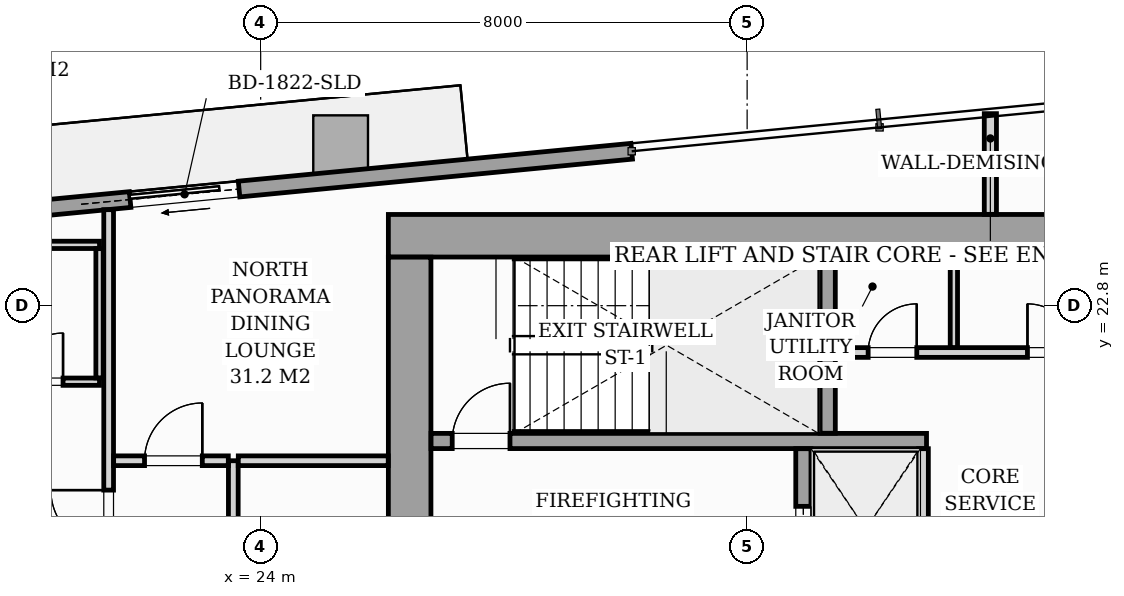
"""IFC4 building model, lengths in metres.
Left out: names, types, materials, properties, quantities, classifications, styles, units other than length and angle.
Written with IfcOpenShell. Run it as: python <this file> out.ifc"""

import sys

from ifc_helpers import new_model, si_unit, direction, frame, frame_2d, origin, origin_2d, place, context, subcontext, project, spatial, rectangle, i_section, extrude, source, transform, mapped, element, fill, save


model = new_model("IFC4")
c1 = context("Model", 3, precision=1e-05, world=origin(), true_north=direction((0.0, 1.0)))
c2 = subcontext(c1, "Body", "Model", "MODEL_VIEW")
j1 = project(units=[si_unit("LENGTHUNIT", "METRE"), si_unit("PLANEANGLEUNIT", "RADIAN")], contexts=[c1])
p1 = place(None, origin())
s1 = spatial("IfcSite", under=j1, at=p1, CompositionType="ELEMENT")
p2 = place(p1, origin())
s2 = spatial("IfcBuilding", under=s1, at=p2, CompositionType="ELEMENT")
p3 = place(p2, frame((0.0, 0.0, 113.0)))
s3 = spatial("IfcBuildingStorey", under=s2, at=p3, CompositionType="ELEMENT", Elevation=113.0)
m1 = source(origin(), c2, "Body", "SweptSolid", [
    extrude(i_section(OverallWidth=0.427, OverallDepth=0.483, WebThickness=0.051, FlangeThickness=0.082, FilletRadius=0.018, at=origin_2d()), origin(), (0.0, 0.0, 1.0), 3.196),
])
for number, where, z_axis, x_axis in (
    (1, (26.4, 24.0, 0.002), (0.0, 0.0, 1.0), (1.0, 0.0, 0.0)),
    (2, (33.12, 24.0, 0.002), (0.0, 0.0, 1.0), (1.0, 0.0, 0.0)),
):
    element("IfcColumn", number, at=place(p3, frame(where, z_axis=z_axis, x_axis=x_axis)), inside=s3, PredefinedType="PILASTER", context=c2, shape_type="MappedRepresentation", body=[
        mapped(m1, transform((0.0, 0.0, 0.0), scale=1.0)),
    ])
m2 = source(origin(), c2, "Body", "SweptSolid", [
    extrude(rectangle(XDim=0.9, YDim=1.1, at=origin_2d()), origin(), (0.0, 0.0, 1.0), 3.196),
])
p4 = place(p3, frame((25.315, 25.38, 0.002), z_axis=(0.0, 0.0, 1.0), x_axis=(0.995396198367, 0.09584575252, 0.0)))
e3 = element("IfcColumn", 3, at=p4, inside=s3, PredefinedType="COLUMN", context=c2, shape_type="MappedRepresentation", body=[
    mapped(m2, transform((0.0, 0.0, 0.0), scale=1.0)),
])
p5 = place(p3, frame((11.08, 23.508, 0.0), z_axis=(0.0, 0.0, 1.0), x_axis=(0.995396638587, 0.095841180552, 0.0)))
e4 = element("IfcWall", 4, at=p5, inside=s3, PredefinedType="STANDARD", context=c2, shape_type="SweptSolid", body=[
    extrude(rectangle(XDim=19.11, YDim=0.26, at=frame_2d((9.555, 0.0))), origin(), (0.0, 0.0, 1.0), 2.94),
])
p6 = place(p5, frame((10.823, 0.0, 0.0)))
e5 = element("IfcOpeningElement", 5, at=p6, cuts=e4, PredefinedType="OPENING", context=c2, shape_type="SweptSolid", body=[
    extrude(rectangle(XDim=1.8, YDim=2.06, at=frame_2d((0.9, 1.03))), frame((0.0, 0.14, 0.0), z_axis=(0.0, -1.0, 0.0), x_axis=(1.0, 0.0, 0.0)), (0.0, 0.0, 1.0), 0.28),
])
p7 = place(p5, frame((2.05, 0.0, 0.65)))
e6 = element("IfcOpeningElement", 6, at=p7, cuts=e4, PredefinedType="OPENING", context=c2, shape_type="SweptSolid", body=[
    extrude(rectangle(XDim=1.6, YDim=1.5, at=frame_2d((0.8, 0.75))), frame((0.0, 0.14, 0.0), z_axis=(0.0, -1.0, 0.0), x_axis=(1.0, 0.0, 0.0)), (0.0, 0.0, 1.0), 0.28),
])
p8 = place(p3, frame((26.1, 23.95, 0.0), z_axis=(0.0, 0.0, 1.0), x_axis=(1.0, 0.0, 0.0)))
e7 = element("IfcWall", 7, at=p8, inside=s3, PredefinedType="SHEAR", context=c2, shape_type="SweptSolid", body=[
    extrude(rectangle(XDim=19.8, YDim=0.7, at=frame_2d((9.9, 0.0))), origin(), (0.0, 0.0, 1.0), 3.2),
])
p9 = place(p3, frame((26.45, 17.802, 0.0), z_axis=(0.0, 0.0, 1.0), x_axis=(0.0, 1.0, 0.0)))
e8 = element("IfcWall", 8, at=p9, inside=s3, PredefinedType="SHEAR", context=c2, shape_type="SweptSolid", body=[
    extrude(rectangle(XDim=5.796, YDim=0.7, at=frame_2d((2.898, 0.0))), origin(), (0.0, 0.0, 1.0), 3.2),
])
p10 = place(p3, frame((26.802, 20.575, 0.0), z_axis=(0.0, 0.0, 1.0), x_axis=(1.0, 0.0, 0.0)))
e9 = element("IfcWall", 9, at=p10, inside=s3, PredefinedType="SOLIDWALL", context=c2, shape_type="SweptSolid", body=[
    extrude(rectangle(XDim=8.148, YDim=0.25, at=frame_2d((4.074, 0.0))), origin(), (0.0, 0.0, 1.0), 3.2),
])
p11 = place(p10, frame((0.348, 0.0, 0.0)))
e10 = element("IfcOpeningElement", 10, at=p11, cuts=e9, PredefinedType="OPENING", context=c2, shape_type="SweptSolid", body=[
    extrude(rectangle(XDim=0.95, YDim=2.06, at=frame_2d((0.475, 1.03))), frame((0.0, 0.135, 0.0), z_axis=(0.0, -1.0, 0.0), x_axis=(1.0, 0.0, 0.0)), (0.0, 0.0, 1.0), 0.27),
])
p12 = place(p3, frame((33.325, 20.702, 0.0), z_axis=(0.0, 0.0, 1.0), x_axis=(0.0, 1.0, 0.0)))
e11 = element("IfcWall", 11, at=p12, inside=s3, PredefinedType="SOLIDWALL", context=c2, shape_type="SweptSolid", body=[
    extrude(rectangle(XDim=2.896, YDim=0.25, at=frame_2d((1.448, 0.0))), origin(), (0.0, 0.0, 1.0), 3.2),
])
p13 = place(p3, frame((32.925, 17.802, 0.0), z_axis=(0.0, 0.0, 1.0), x_axis=(0.0, 1.0, 0.0)))
e12 = element("IfcWall", 12, at=p13, inside=s3, PredefinedType="SOLIDWALL", context=c2, shape_type="SweptSolid", body=[
    extrude(rectangle(XDim=2.646, YDim=0.25, at=frame_2d((1.323, 0.0))), origin(), (0.0, 0.0, 1.0), 3.2),
])
p14 = place(p13, frame((0.598, 0.0, 0.0)))
e13 = element("IfcOpeningElement", 13, at=p14, cuts=e12, PredefinedType="OPENING", context=c2, shape_type="SweptSolid", body=[
    extrude(rectangle(XDim=1.1, YDim=2.08, at=frame_2d((0.55, 1.04))), frame((0.0, 0.135, 0.0), z_axis=(0.0, -1.0, 0.0), x_axis=(1.0, 0.0, 0.0)), (0.0, 0.0, 1.0), 0.27),
])
p15 = place(p3, frame((34.9, 17.802, 0.0), z_axis=(0.0, 0.0, 1.0), x_axis=(0.0, 1.0, 0.0)))
e14 = element("IfcWall", 14, at=p15, inside=s3, PredefinedType="PARTITIONING", context=c2, shape_type="SweptSolid", body=[
    extrude(rectangle(XDim=2.646, YDim=0.16, at=frame_2d((1.323, 0.0))), origin(), (0.0, 0.0, 1.0), 2.94),
])
p16 = place(p3, frame((33.452, 22.03, 0.0), z_axis=(0.0, 0.0, 1.0), x_axis=(1.0, 0.0, 0.0)))
e15 = element("IfcWall", 15, at=p16, inside=s3, PredefinedType="PARTITIONING", context=c2, shape_type="SweptSolid", body=[
    extrude(rectangle(XDim=5.096, YDim=0.16, at=frame_2d((2.548, 0.0))), origin(), (0.0, 0.0, 1.0), 2.94),
])
p17 = place(p16, frame((0.538, 0.0, 0.0)))
e16 = element("IfcOpeningElement", 16, at=p17, cuts=e15, PredefinedType="OPENING", context=c2, shape_type="SweptSolid", body=[
    extrude(rectangle(XDim=0.8, YDim=2.05, at=frame_2d((0.4, 1.025))), frame((0.0, 0.09, 0.0), z_axis=(0.0, -1.0, 0.0), x_axis=(1.0, 0.0, 0.0)), (0.0, 0.0, 1.0), 0.18),
])
p18 = place(p16, frame((3.158, 0.0, 0.0)))
e17 = element("IfcOpeningElement", 17, at=p18, cuts=e15, PredefinedType="OPENING", context=c2, shape_type="SweptSolid", body=[
    extrude(rectangle(XDim=0.8, YDim=2.05, at=frame_2d((0.4, 1.025))), frame((0.0, 0.09, 0.0), z_axis=(0.0, -1.0, 0.0), x_axis=(1.0, 0.0, 0.0)), (0.0, 0.0, 1.0), 0.18),
])
p19 = place(p3, frame((35.4, 22.112, 0.0), z_axis=(0.0, 0.0, 1.0), x_axis=(0.0, 1.0, 0.0)))
e18 = element("IfcWall", 18, at=p19, inside=s3, PredefinedType="PARTITIONING", context=c2, shape_type="SweptSolid", body=[
    extrude(rectangle(XDim=1.486, YDim=0.12, at=frame_2d((0.743, 0.0))), origin(), (0.0, 0.0, 1.0), 2.94),
])
p20 = place(p3, frame((21.5, 12.732, 0.0), z_axis=(0.0, 0.0, 1.0), x_axis=(0.0, 1.0, 0.0)))
e19 = element("IfcWall", 19, at=p20, inside=s3, PredefinedType="PARTITIONING", context=c2, shape_type="SweptSolid", body=[
    extrude(rectangle(XDim=11.647, YDim=0.16, at=frame_2d((5.823, 0.0))), origin(), (0.0, 0.0, 1.0), 2.94),
])
p21 = place(p20, frame((0.493, 0.0, 0.0)))
e20 = element("IfcOpeningElement", 20, at=p21, cuts=e19, PredefinedType="OPENING", context=c2, shape_type="SweptSolid", body=[
    extrude(rectangle(XDim=0.95, YDim=2.06, at=frame_2d((0.475, 1.03))), frame((0.0, 0.09, 0.0), z_axis=(0.0, -1.0, 0.0), x_axis=(1.0, 0.0, 0.0)), (0.0, 0.0, 1.0), 0.18),
])
p22 = place(p20, frame((6.085, 0.0, 0.0)))
e21 = element("IfcOpeningElement", 21, at=p22, cuts=e19, PredefinedType="OPENING", context=c2, shape_type="SweptSolid", body=[
    extrude(rectangle(XDim=0.95, YDim=2.06, at=frame_2d((0.475, 1.03))), frame((0.0, 0.09, 0.0), z_axis=(0.0, -1.0, 0.0), x_axis=(1.0, 0.0, 0.0)), (0.0, 0.0, 1.0), 0.18),
])
p23 = place(p3, frame((36.0, 24.302, 0.0), z_axis=(0.0, 0.0, 1.0), x_axis=(0.0, 1.0, 0.0)))
e22 = element("IfcWall", 22, at=p23, inside=s3, PredefinedType="PARTITIONING", context=c2, shape_type="SweptSolid", body=[
    extrude(rectangle(XDim=1.656, YDim=0.2, at=frame_2d((0.828, 0.0))), origin(), (0.0, 0.0, 1.0), 2.94),
])
p24 = place(p3, frame((17.15, 21.55, 0.0), z_axis=(0.0, 0.0, 1.0), x_axis=(1.0, 0.0, 0.0)))
e23 = element("IfcWall", 23, at=p24, inside=s3, PredefinedType="PARTITIONING", context=c2, shape_type="SweptSolid", body=[
    extrude(rectangle(XDim=4.2, YDim=0.12, at=frame_2d((2.1, 0.0))), origin(), (0.0, 0.0, 1.0), 2.94),
])
p25 = place(p24, frame((0.675, 0.0, 0.0)))
e24 = element("IfcOpeningElement", 24, at=p25, cuts=e23, PredefinedType="OPENING", context=c2, shape_type="SweptSolid", body=[
    extrude(rectangle(XDim=0.85, YDim=2.05, at=frame_2d((0.425, 1.025))), frame((0.0, 0.07, 0.0), z_axis=(0.0, -1.0, 0.0), x_axis=(1.0, 0.0, 0.0)), (0.0, 0.0, 1.0), 0.14),
])
p26 = place(p24, frame((2.8, 0.0, 0.0)))
e25 = element("IfcOpeningElement", 25, at=p26, cuts=e23, PredefinedType="OPENING", context=c2, shape_type="SweptSolid", body=[
    extrude(rectangle(XDim=0.8, YDim=2.02, at=frame_2d((0.4, 1.01))), frame((0.0, 0.07, 0.0), z_axis=(0.0, -1.0, 0.0), x_axis=(1.0, 0.0, 0.0)), (0.0, 0.0, 1.0), 0.14),
])
p27 = place(p3, frame((17.15, 23.8, 0.0), z_axis=(0.0, 0.0, 1.0), x_axis=(1.0, 0.0, 0.0)))
e26 = element("IfcWall", 26, at=p27, inside=s3, PredefinedType="PARTITIONING", context=c2, shape_type="SweptSolid", body=[
    extrude(rectangle(XDim=4.2, YDim=0.12, at=frame_2d((2.1, 0.0))), origin(), (0.0, 0.0, 1.0), 2.31),
])
p28 = place(p3, frame((21.35, 21.612, 0.0), z_axis=(0.0, 0.0, 1.0), x_axis=(0.0, 1.0, 0.0)))
e27 = element("IfcWall", 27, at=p28, inside=s3, PredefinedType="PARTITIONING", context=c2, shape_type="SweptSolid", body=[
    extrude(rectangle(XDim=2.126, YDim=0.12, at=frame_2d((1.063, 0.0))), origin(), (0.0, 0.0, 1.0), 2.94),
])
p29 = place(p3, frame((23.55, 14.66, 0.0), z_axis=(0.0, 0.0, 1.0), x_axis=(0.0, 1.0, 0.0)))
e28 = element("IfcWall", 28, at=p29, inside=s3, PredefinedType="PARTITIONING", context=c2, shape_type="SweptSolid", body=[
    extrude(rectangle(XDim=5.59, YDim=0.16, at=frame_2d((2.795, 0.0))), origin(), (0.0, 0.0, 1.0), 2.94),
])
p30 = place(p29, frame((2.36, 0.0, 0.0)))
e29 = element("IfcOpeningElement", 29, at=p30, cuts=e28, PredefinedType="OPENING", context=c2, shape_type="SweptSolid", body=[
    extrude(rectangle(XDim=0.95, YDim=2.06, at=frame_2d((0.475, 1.03))), frame((0.0, 0.09, 0.0), z_axis=(0.0, -1.0, 0.0), x_axis=(1.0, 0.0, 0.0)), (0.0, 0.0, 1.0), 0.18),
])
p31 = place(p3, frame((21.582, 20.25, 0.0), z_axis=(0.0, 0.0, 1.0), x_axis=(1.0, 0.0, 0.0)))
e30 = element("IfcWall", 30, at=p31, inside=s3, PredefinedType="PARTITIONING", context=c2, shape_type="SweptSolid", body=[
    extrude(rectangle(XDim=1.886, YDim=0.16, at=frame_2d((0.943, 0.0))), origin(), (0.0, 0.0, 1.0), 2.94),
])
p32 = place(p31, frame((0.508, 0.0, 0.0)))
e31 = element("IfcOpeningElement", 31, at=p32, cuts=e30, PredefinedType="OPENING", context=c2, shape_type="SweptSolid", body=[
    extrude(rectangle(XDim=0.95, YDim=2.06, at=frame_2d((0.475, 1.03))), frame((0.0, 0.09, 0.0), z_axis=(0.0, -1.0, 0.0), x_axis=(1.0, 0.0, 0.0)), (0.0, 0.0, 1.0), 0.18),
])
p33 = place(p3, frame((23.632, 20.25, 0.0), z_axis=(0.0, 0.0, 1.0), x_axis=(1.0, 0.0, 0.0)))
e32 = element("IfcWall", 32, at=p33, inside=s3, PredefinedType="PARTITIONING", context=c2, shape_type="SweptSolid", body=[
    extrude(rectangle(XDim=2.466, YDim=0.16, at=frame_2d((1.233, 0.0))), origin(), (0.0, 0.0, 1.0), 2.94),
])
m3 = source(origin(), c2, "Body", "SweptSolid", [
    extrude(rectangle(XDim=1.8, YDim=2.06, at=frame_2d((0.9, 1.03))), frame((0.0, 0.025, 0.0), z_axis=(0.0, -1.0, 0.0), x_axis=(1.0, 0.0, 0.0)), (0.0, 0.0, 1.0), 0.05),
])
p34 = place(p6, origin())
e33 = element("IfcDoor", 33, at=p34, inside=s3, OperationType="SLIDING_TO_LEFT", PredefinedType="DOOR", context=c2, shape_type="MappedRepresentation", body=[
    mapped(m3, transform((0.0, 0.0, 0.0), scale=1.0)),
])
fill(e5, e33)
m4 = source(origin(), c2, "Body", "SweptSolid", [
    extrude(rectangle(XDim=0.95, YDim=2.06, at=frame_2d((0.475, 1.03))), frame((0.0, 0.025, 0.0), z_axis=(0.0, -1.0, 0.0), x_axis=(1.0, 0.0, 0.0)), (0.0, 0.0, 1.0), 0.05),
])
p35 = place(p11, origin())
e34 = element("IfcDoor", 34, at=p35, inside=s3, OperationType="SINGLE_SWING_RIGHT", PredefinedType="DOOR", context=c2, shape_type="MappedRepresentation", body=[
    mapped(m4, transform((0.0, 0.0, 0.0), scale=1.0)),
])
fill(e10, e34)
m5 = source(origin(), c2, "Body", "SweptSolid", [
    extrude(rectangle(XDim=1.1, YDim=2.08, at=frame_2d((0.55, 1.04))), frame((0.0, 0.025, 0.0), z_axis=(0.0, -1.0, 0.0), x_axis=(1.0, 0.0, 0.0)), (0.0, 0.0, 1.0), 0.05),
])
p36 = place(p14, origin())
e35 = element("IfcDoor", 35, at=p36, inside=s3, OperationType="SLIDING_TO_LEFT", PredefinedType="DOOR", context=c2, shape_type="MappedRepresentation", body=[
    mapped(m5, transform((0.0, 0.0, 0.0), scale=1.0)),
])
fill(e13, e35)
m6 = source(origin(), c2, "Body", "SweptSolid", [
    extrude(rectangle(XDim=0.8, YDim=2.05, at=frame_2d((0.4, 1.025))), frame((0.0, 0.025, 0.0), z_axis=(0.0, -1.0, 0.0), x_axis=(1.0, 0.0, 0.0)), (0.0, 0.0, 1.0), 0.05),
])
p37 = place(p17, origin())
e36 = element("IfcDoor", 36, at=p37, inside=s3, OperationType="SINGLE_SWING_RIGHT", PredefinedType="DOOR", context=c2, shape_type="MappedRepresentation", body=[
    mapped(m6, transform((0.0, 0.0, 0.0), scale=1.0)),
])
fill(e16, e36)
p38 = place(p18, origin())
e37 = element("IfcDoor", 37, at=p38, inside=s3, OperationType="SINGLE_SWING_LEFT", PredefinedType="DOOR", context=c2, shape_type="MappedRepresentation", body=[
    mapped(m6, transform((0.0, 0.0, 0.0), scale=1.0)),
])
fill(e17, e37)
m7 = source(origin(), c2, "Body", "SweptSolid", [
    extrude(rectangle(XDim=0.95, YDim=2.06, at=frame_2d((0.475, 1.03))), frame((0.0, 0.025, 0.0), z_axis=(0.0, -1.0, 0.0), x_axis=(1.0, 0.0, 0.0)), (0.0, 0.0, 1.0), 0.05),
])
p39 = place(p22, origin())
e38 = element("IfcDoor", 38, at=p39, inside=s3, OperationType="SINGLE_SWING_RIGHT", PredefinedType="DOOR", context=c2, shape_type="MappedRepresentation", body=[
    mapped(m7, transform((0.0, 0.0, 0.0), scale=1.0)),
])
fill(e21, e38)
m8 = source(origin(), c2, "Body", "SweptSolid", [
    extrude(rectangle(XDim=0.8, YDim=2.02, at=frame_2d((0.4, 1.01))), frame((0.0, 0.025, 0.0), z_axis=(0.0, -1.0, 0.0), x_axis=(1.0, 0.0, 0.0)), (0.0, 0.0, 1.0), 0.05),
])
p40 = place(p26, origin())
e39 = element("IfcDoor", 39, at=p40, inside=s3, OperationType="SINGLE_SWING_RIGHT", PredefinedType="DOOR", context=c2, shape_type="MappedRepresentation", body=[
    mapped(m8, transform((0.0, 0.0, 0.0), scale=1.0)),
])
fill(e25, e39)
p41 = place(p32, origin())
e40 = element("IfcDoor", 40, at=p41, inside=s3, OperationType="SINGLE_SWING_RIGHT", PredefinedType="DOOR", context=c2, shape_type="MappedRepresentation", body=[
    mapped(m7, transform((0.0, 0.0, 0.0), scale=1.0)),
])
fill(e31, e40)
save(model, sys.argv[1])
